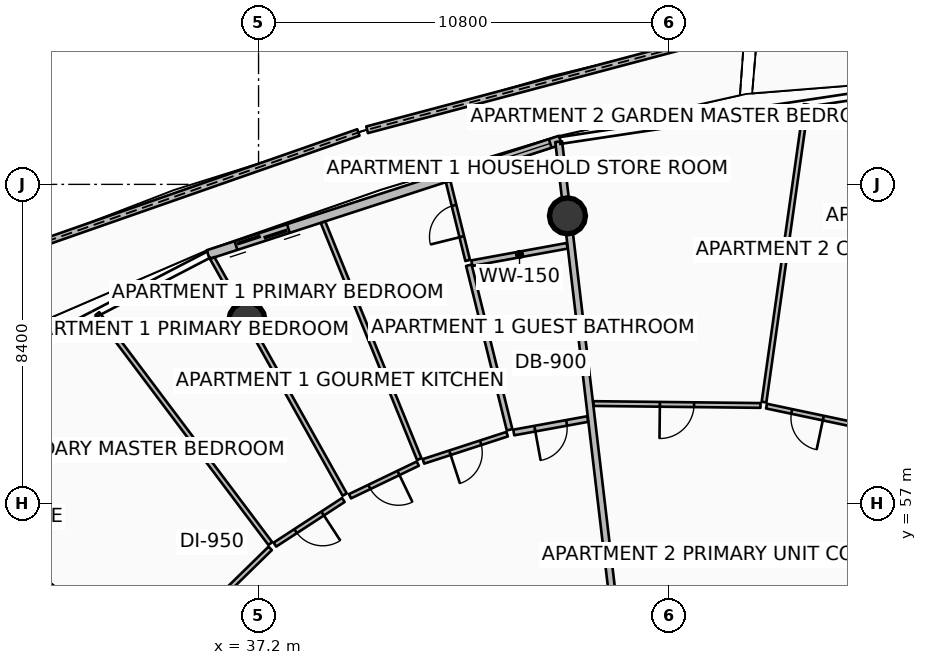
"""IFC4 building model, lengths in metres.
Left out: names, types, materials, properties, quantities, classifications, styles, units other than length and angle.
Written with IfcOpenShell. Run it as: python <this file> out.ifc"""

import sys

from ifc_helpers import new_model, si_unit, direction, frame, frame_2d, origin, origin_2d, place, context, subcontext, project, spatial, polyline, rectangle, circle, outline, extrude, element, fill, save


model = new_model("IFC4")
c1 = context("Model", 3, precision=1e-05, world=origin(), true_north=direction((0.0, 1.0)))
c2 = subcontext(c1, "Body", "Model", "MODEL_VIEW")
j1 = project(units=[si_unit("LENGTHUNIT", "METRE"), si_unit("PLANEANGLEUNIT", "RADIAN")], contexts=[c1])
p1 = place(None, origin())
s1 = spatial("IfcSite", under=j1, at=p1, CompositionType="ELEMENT")
p2 = place(p1, origin())
s2 = spatial("IfcBuilding", under=s1, at=p2, CompositionType="ELEMENT")
p3 = place(p2, frame((0.0, 0.0, 263.65)))
s3 = spatial("IfcBuildingStorey", under=s2, at=p3, CompositionType="ELEMENT", Elevation=263.65)
for number, where, z_axis, x_axis in (
    (1, (45.329, 64.571, 0.0), (0.0, 0.0, 1.0), (1.0, 0.0, 0.0)),
    (2, (36.895, 61.83, 0.0), (0.0, 0.0, 1.0), (1.0, 0.0, 0.0)),
):
    element("IfcColumn", number, at=place(p3, frame(where, z_axis=z_axis, x_axis=x_axis)), inside=s3, PredefinedType="COLUMN", context=c2, shape_type="SweptSolid", body=[
        extrude(circle(Radius=0.475, at=origin_2d()), origin(), (0.0, 0.0, 1.0), 3.59),
    ])
p4 = place(p3, frame((49.993, 69.473, 0.0), z_axis=(0.0, 0.0, 1.0), x_axis=(-0.96657188746, -0.256395761219, 0.0)))
e3 = element("IfcWall", 3, at=p4, inside=s3, PredefinedType="PARAPET", context=c2, shape_type="SweptSolid", body=[
    extrude(outline(polyline([(0.0, 0.0), (10.281, 0.0), (10.281, 1.148), (5.14, 1.127), (0.0, 1.224), (0.0, 0.0)])), frame((0.0, 0.09, 0.0), z_axis=(0.0, -1.0, 0.0), x_axis=(1.0, 0.0, 0.0)), (0.0, 0.0, 1.0), 0.18),
])
p5 = place(p3, frame((39.827, 66.766, 0.0), z_axis=(0.0, 0.0, 1.0), x_axis=(-0.944003849273, -0.329934436757, 0.0)))
e4 = element("IfcWall", 4, at=p5, inside=s3, PredefinedType="PARAPET", context=c2, shape_type="SweptSolid", body=[
    extrude(outline(polyline([(0.0, 0.0), (10.406, 0.0), (10.406, 1.483), (5.203, 1.284), (0.0, 1.148), (0.0, 0.0)])), frame((0.0, 0.09, 0.0), z_axis=(0.0, -1.0, 0.0), x_axis=(1.0, 0.0, 0.0)), (0.0, 0.0, 1.0), 0.18),
])
p6 = place(p3, frame((45.142, 66.564, 0.0), z_axis=(0.0, 0.0, 1.0), x_axis=(-0.951055974609, -0.309018661507, 0.0)))
e5 = element("IfcWall", 5, at=p6, inside=s3, PredefinedType="SOLIDWALL", context=c2, shape_type="SweptSolid", body=[
    extrude(rectangle(XDim=9.745, YDim=0.24, at=frame_2d((4.873, 0.0))), origin(), (0.0, 0.0, 1.0), 2.54),
])
p7 = place(p6, frame((7.525, 0.0, 0.0)))
e6 = element("IfcOpeningElement", 6, at=p7, cuts=e5, PredefinedType="OPENING", context=c2, shape_type="SweptSolid", body=[
    extrude(rectangle(XDim=1.45, YDim=2.15, at=frame_2d((0.725, 1.075))), frame((0.0, 0.13, 0.0), z_axis=(0.0, -1.0, 0.0), x_axis=(1.0, 0.0, 0.0)), (0.0, 0.0, 1.0), 0.26),
])
p8 = place(p6, frame((0.28, 0.0, 0.65)))
e7 = element("IfcOpeningElement", 7, at=p8, cuts=e5, PredefinedType="OPENING", context=c2, shape_type="SweptSolid", body=[
    extrude(rectangle(XDim=1.6, YDim=1.5, at=frame_2d((0.8, 0.75))), frame((0.0, 0.13, 0.0), z_axis=(0.0, -1.0, 0.0), x_axis=(1.0, 0.0, 0.0)), (0.0, 0.0, 1.0), 0.26),
])
p9 = place(p3, frame((46.75, 52.559, 0.0), z_axis=(0.0, 0.0, 1.0), x_axis=(-0.117540318076, 0.993068111273, 0.0)))
e8 = element("IfcWall", 8, at=p9, inside=s3, PredefinedType="PARTITIONING", context=c2, shape_type="SweptSolid", body=[
    extrude(rectangle(XDim=14.062, YDim=0.18, at=frame_2d((7.031, 0.0))), origin(), (0.0, 0.0, 1.0), 2.957),
])
p10 = place(p3, frame((45.861, 59.226, 0.0), z_axis=(0.0, 0.0, 1.0), x_axis=(-0.983812554945, -0.179200604723, 0.0)))
e9 = element("IfcWall", 9, at=p10, inside=s3, PredefinedType="PARTITIONING", context=c2, shape_type="SweptSolid", body=[
    extrude(rectangle(XDim=1.977, YDim=0.15, at=frame_2d((0.988, 0.0))), origin(), (0.0, 0.0, 1.0), 2.957),
])
p11 = place(p10, frame((0.563, 0.0, 0.0)))
e10 = element("IfcOpeningElement", 10, at=p11, cuts=e9, PredefinedType="OPENING", context=c2, shape_type="SweptSolid", body=[
    extrude(rectangle(XDim=0.85, YDim=2.06, at=frame_2d((0.425, 1.03))), frame((0.0, 0.085, 0.0), z_axis=(0.0, -1.0, 0.0), x_axis=(1.0, 0.0, 0.0)), (0.0, 0.0, 1.0), 0.17),
])
p12 = place(p3, frame((45.321, 63.784, 0.0), z_axis=(0.0, 0.0, 1.0), x_axis=(-0.983788616277, -0.179331978422, 0.0)))
e11 = element("IfcWall", 11, at=p12, inside=s3, PredefinedType="PARTITIONING", context=c2, shape_type="SweptSolid", body=[
    extrude(rectangle(XDim=2.55, YDim=0.15, at=frame_2d((1.275, 0.0))), origin(), (0.0, 0.0, 1.0), 2.957),
])
p13 = place(p3, frame((43.806, 58.943, 0.0), z_axis=(0.0, 0.0, 1.0), x_axis=(-0.240319531841, 0.970693835674, 0.0)))
e12 = element("IfcWall", 12, at=p13, inside=s3, PredefinedType="PARTITIONING", context=c2, shape_type="SweptSolid", body=[
    extrude(rectangle(XDim=4.46, YDim=0.15, at=frame_2d((2.23, 0.0))), origin(), (0.0, 0.0, 1.0), 3.03),
])
p14 = place(p3, frame((42.703, 63.398, 0.0), z_axis=(0.0, 0.0, 1.0), x_axis=(-0.240385432392, 0.970677517971, 0.0)))
e13 = element("IfcWall", 13, at=p14, inside=s3, PredefinedType="PARTITIONING", context=c2, shape_type="SweptSolid", body=[
    extrude(rectangle(XDim=2.138, YDim=0.125, at=frame_2d((1.069, 0.0))), origin(), (0.0, 0.0, 1.0), 3.03),
])
p15 = place(p14, frame((0.644, 0.0, 0.0)))
e14 = element("IfcOpeningElement", 14, at=p15, cuts=e13, PredefinedType="OPENING", context=c2, shape_type="SweptSolid", body=[
    extrude(rectangle(XDim=0.85, YDim=2.06, at=frame_2d((0.425, 1.03))), frame((0.0, 0.073, 0.0), z_axis=(0.0, -1.0, 0.0), x_axis=(1.0, 0.0, 0.0)), (0.0, 0.0, 1.0), 0.145),
])
p16 = place(p3, frame((41.429, 58.17, 0.0), z_axis=(0.0, 0.0, 1.0), x_axis=(-0.376458801215, 0.926433360252, 0.0)))
e15 = element("IfcWall", 15, at=p16, inside=s3, PredefinedType="PARTITIONING", context=c2, shape_type="SweptSolid", body=[
    extrude(rectangle(XDim=6.728, YDim=0.125, at=frame_2d((3.364, 0.0))), origin(), (0.0, 0.0, 1.0), 3.03),
])
p17 = place(p3, frame((43.742, 58.827, 0.0), z_axis=(0.0, 0.0, 1.0), x_axis=(-0.950997650668, -0.309198105466, 0.0)))
e16 = element("IfcWall", 16, at=p17, inside=s3, PredefinedType="PARTITIONING", context=c2, shape_type="SweptSolid", body=[
    extrude(rectangle(XDim=2.316, YDim=0.125, at=frame_2d((1.158, 0.0))), origin(), (0.0, 0.0, 1.0), 3.03),
])
p18 = place(p17, frame((0.733, 0.0, 0.0)))
e17 = element("IfcOpeningElement", 17, at=p18, cuts=e16, PredefinedType="OPENING", context=c2, shape_type="SweptSolid", body=[
    extrude(rectangle(XDim=0.85, YDim=2.06, at=frame_2d((0.425, 1.03))), frame((0.0, 0.073, 0.0), z_axis=(0.0, -1.0, 0.0), x_axis=(1.0, 0.0, 0.0)), (0.0, 0.0, 1.0), 0.145),
])
p19 = place(p3, frame((41.391, 58.052, 0.0), z_axis=(0.0, 0.0, 1.0), x_axis=(-0.901197816095, -0.433408002079, 0.0)))
e18 = element("IfcWall", 18, at=p19, inside=s3, PredefinedType="PARTITIONING", context=c2, shape_type="SweptSolid", body=[
    extrude(rectangle(XDim=1.981, YDim=0.125, at=frame_2d((0.991, 0.0))), origin(), (0.0, 0.0, 1.0), 2.957),
])
p20 = place(p19, frame((0.565, 0.0, 0.0)))
e19 = element("IfcOpeningElement", 19, at=p20, cuts=e18, PredefinedType="OPENING", context=c2, shape_type="SweptSolid", body=[
    extrude(rectangle(XDim=0.85, YDim=2.06, at=frame_2d((0.425, 1.03))), frame((0.0, 0.073, 0.0), z_axis=(0.0, -1.0, 0.0), x_axis=(1.0, 0.0, 0.0)), (0.0, 0.0, 1.0), 0.145),
])
p21 = place(p3, frame((39.467, 57.237, 0.0), z_axis=(0.0, 0.0, 1.0), x_axis=(-0.488642985948, 0.872483829239, 0.0)))
e20 = element("IfcWall", 20, at=p21, inside=s3, PredefinedType="PARTITIONING", context=c2, shape_type="SweptSolid", body=[
    extrude(rectangle(XDim=7.131, YDim=0.125, at=frame_2d((3.565, 0.0))), origin(), (0.0, 0.0, 1.0), 2.957),
])
p22 = place(p3, frame((37.509, 55.949, 0.0), z_axis=(0.0, 0.0, 1.0), x_axis=(-0.60104674722, 0.799213868534, 0.0)))
e21 = element("IfcWall", 21, at=p22, inside=s3, PredefinedType="PARTITIONING", context=c2, shape_type="SweptSolid", body=[
    extrude(rectangle(XDim=7.572, YDim=0.125, at=frame_2d((3.786, 0.0))), origin(), (0.0, 0.0, 1.0), 3.03),
])
p23 = place(p3, frame((39.432, 57.095, 0.0), z_axis=(0.0, 0.0, 1.0), x_axis=(-0.837734795217, -0.546077295703, 0.0)))
e22 = element("IfcWall", 22, at=p23, inside=s3, PredefinedType="PARTITIONING", context=c2, shape_type="SweptSolid", body=[
    extrude(rectangle(XDim=2.15, YDim=0.125, at=frame_2d((1.075, 0.0))), origin(), (0.0, 0.0, 1.0), 2.957),
])
p24 = place(p23, frame((0.65, 0.0, 0.0)))
e23 = element("IfcOpeningElement", 23, at=p24, cuts=e22, PredefinedType="OPENING", context=c2, shape_type="SweptSolid", body=[
    extrude(rectangle(XDim=0.85, YDim=2.06, at=frame_2d((0.425, 1.03))), frame((0.0, 0.073, 0.0), z_axis=(0.0, -1.0, 0.0), x_axis=(1.0, 0.0, 0.0)), (0.0, 0.0, 1.0), 0.145),
])
p25 = place(p3, frame((37.506, 55.822, 0.0), z_axis=(0.0, 0.0, 1.0), x_axis=(-0.715105814901, -0.699016218334, 0.0)))
e24 = element("IfcWall", 24, at=p25, inside=s3, PredefinedType="PARTITIONING", context=c2, shape_type="SweptSolid", body=[
    extrude(rectangle(XDim=4.294, YDim=0.125, at=frame_2d((2.147, 0.0))), origin(), (0.0, 0.0, 1.0), 2.957),
])
p26 = place(p25, frame((1.697, 0.0, 0.0)))
e25 = element("IfcOpeningElement", 25, at=p26, cuts=e24, PredefinedType="OPENING", context=c2, shape_type="SweptSolid", body=[
    extrude(rectangle(XDim=0.9, YDim=2.08, at=frame_2d((0.45, 1.04))), frame((0.0, 0.073, 0.0), z_axis=(0.0, -1.0, 0.0), x_axis=(1.0, 0.0, 0.0)), (0.0, 0.0, 1.0), 0.145),
])
p27 = place(p3, frame((34.285, 52.812, 0.0), z_axis=(0.0, 0.0, 1.0), x_axis=(-0.785324921183, 0.619083813526, 0.0)))
e26 = element("IfcWall", 26, at=p27, inside=s3, PredefinedType="PARTITIONING", context=c2, shape_type="SweptSolid", body=[
    extrude(rectangle(XDim=9.621, YDim=0.125, at=frame_2d((4.811, 0.0))), origin(), (0.0, 0.0, 1.0), 2.957),
])
p28 = place(p3, frame((50.501, 59.671, 0.0), z_axis=(0.0, 0.0, 1.0), x_axis=(0.140142335256, 0.990131367986, 0.0)))
e27 = element("IfcWall", 27, at=p28, inside=s3, PredefinedType="PARTITIONING", context=c2, shape_type="SweptSolid", body=[
    extrude(rectangle(XDim=7.911, YDim=0.125, at=frame_2d((3.956, 0.0))), origin(), (0.0, 0.0, 1.0), 3.03),
])
p29 = place(p3, frame((52.722, 59.111, 0.0), z_axis=(0.0, 0.0, 1.0), x_axis=(-0.978503905914, 0.206228286399, 0.0)))
e28 = element("IfcWall", 28, at=p29, inside=s3, PredefinedType="PARTITIONING", context=c2, shape_type="SweptSolid", body=[
    extrude(rectangle(XDim=2.203, YDim=0.125, at=frame_2d((1.102, 0.0))), origin(), (0.0, 0.0, 1.0), 2.957),
])
p30 = place(p29, frame((0.677, 0.0, 0.0)))
e29 = element("IfcOpeningElement", 29, at=p30, cuts=e28, PredefinedType="OPENING", context=c2, shape_type="SweptSolid", body=[
    extrude(rectangle(XDim=0.85, YDim=2.06, at=frame_2d((0.425, 1.03))), frame((0.0, 0.073, 0.0), z_axis=(0.0, -1.0, 0.0), x_axis=(1.0, 0.0, 0.0)), (0.0, 0.0, 1.0), 0.145),
])
p31 = place(p3, frame((50.408, 59.583, 0.0), z_axis=(0.0, 0.0, 1.0), x_axis=(-0.999935174521, 0.01138625289, 0.0)))
e30 = element("IfcWall", 30, at=p31, inside=s3, PredefinedType="PARTITIONING", context=c2, shape_type="SweptSolid", body=[
    extrude(rectangle(XDim=4.396, YDim=0.125, at=frame_2d((2.198, 0.0))), origin(), (0.0, 0.0, 1.0), 3.03),
])
p32 = place(p31, frame((1.748, 0.0, 0.0)))
e31 = element("IfcOpeningElement", 31, at=p32, cuts=e30, PredefinedType="OPENING", context=c2, shape_type="SweptSolid", body=[
    extrude(rectangle(XDim=0.9, YDim=2.08, at=frame_2d((0.45, 1.04))), frame((0.0, 0.073, 0.0), z_axis=(0.0, -1.0, 0.0), x_axis=(1.0, 0.0, 0.0)), (0.0, 0.0, 1.0), 0.145),
])
p33 = place(p7, origin())
e32 = element("IfcDoor", 32, at=p33, inside=s3, OperationType="DOUBLE_DOOR_SLIDING", PredefinedType="DOOR", context=c2, shape_type="SweptSolid", body=[
    extrude(rectangle(XDim=1.45, YDim=2.15, at=frame_2d((0.725, 1.075))), frame((0.0, 0.025, 0.0), z_axis=(0.0, -1.0, 0.0), x_axis=(1.0, 0.0, 0.0)), (0.0, 0.0, 1.0), 0.05),
])
fill(e6, e32)
p34 = place(p8, origin())
e33 = element("IfcWindow", 33, at=p34, inside=s3, PartitioningType="SINGLE_PANEL", PredefinedType="WINDOW", context=c2, shape_type="SweptSolid", body=[
    extrude(rectangle(XDim=1.6, YDim=1.5, at=frame_2d((0.8, 0.75))), frame((0.0, 0.03, 0.0), z_axis=(0.0, -1.0, 0.0), x_axis=(1.0, 0.0, 0.0)), (0.0, 0.0, 1.0), 0.06),
])
fill(e7, e33)
p35 = place(p11, origin())
e34 = element("IfcDoor", 34, at=p35, inside=s3, OperationType="SINGLE_SWING_RIGHT", PredefinedType="DOOR", context=c2, shape_type="SweptSolid", body=[
    extrude(rectangle(XDim=0.85, YDim=2.06, at=frame_2d((0.425, 1.03))), frame((0.0, 0.025, 0.0), z_axis=(0.0, -1.0, 0.0), x_axis=(1.0, 0.0, 0.0)), (0.0, 0.0, 1.0), 0.05),
])
fill(e10, e34)
p36 = place(p15, origin())
e35 = element("IfcDoor", 35, at=p36, inside=s3, OperationType="SINGLE_SWING_LEFT", PredefinedType="DOOR", context=c2, shape_type="SweptSolid", body=[
    extrude(rectangle(XDim=0.85, YDim=2.06, at=frame_2d((0.425, 1.03))), frame((0.0, 0.025, 0.0), z_axis=(0.0, -1.0, 0.0), x_axis=(1.0, 0.0, 0.0)), (0.0, 0.0, 1.0), 0.05),
])
fill(e14, e35)
p37 = place(p18, origin())
e36 = element("IfcDoor", 36, at=p37, inside=s3, OperationType="SINGLE_SWING_RIGHT", PredefinedType="DOOR", context=c2, shape_type="SweptSolid", body=[
    extrude(rectangle(XDim=0.85, YDim=2.06, at=frame_2d((0.425, 1.03))), frame((0.0, 0.025, 0.0), z_axis=(0.0, -1.0, 0.0), x_axis=(1.0, 0.0, 0.0)), (0.0, 0.0, 1.0), 0.05),
])
fill(e17, e36)
p38 = place(p20, origin())
e37 = element("IfcDoor", 37, at=p38, inside=s3, OperationType="SINGLE_SWING_LEFT", PredefinedType="DOOR", context=c2, shape_type="SweptSolid", body=[
    extrude(rectangle(XDim=0.85, YDim=2.06, at=frame_2d((0.425, 1.03))), frame((0.0, 0.025, 0.0), z_axis=(0.0, -1.0, 0.0), x_axis=(1.0, 0.0, 0.0)), (0.0, 0.0, 1.0), 0.05),
])
fill(e19, e37)
p39 = place(p24, origin())
e38 = element("IfcDoor", 38, at=p39, inside=s3, OperationType="SINGLE_SWING_LEFT", PredefinedType="DOOR", context=c2, shape_type="SweptSolid", body=[
    extrude(rectangle(XDim=0.85, YDim=2.06, at=frame_2d((0.425, 1.03))), frame((0.0, 0.025, 0.0), z_axis=(0.0, -1.0, 0.0), x_axis=(1.0, 0.0, 0.0)), (0.0, 0.0, 1.0), 0.05),
])
fill(e23, e38)
p40 = place(p30, origin())
e39 = element("IfcDoor", 39, at=p40, inside=s3, OperationType="SINGLE_SWING_LEFT", PredefinedType="DOOR", context=c2, shape_type="SweptSolid", body=[
    extrude(rectangle(XDim=0.85, YDim=2.06, at=frame_2d((0.425, 1.03))), frame((0.0, 0.025, 0.0), z_axis=(0.0, -1.0, 0.0), x_axis=(1.0, 0.0, 0.0)), (0.0, 0.0, 1.0), 0.05),
])
fill(e29, e39)
p41 = place(p32, origin())
e40 = element("IfcDoor", 40, at=p41, inside=s3, OperationType="SINGLE_SWING_RIGHT", PredefinedType="DOOR", context=c2, shape_type="SweptSolid", body=[
    extrude(rectangle(XDim=0.9, YDim=2.08, at=frame_2d((0.45, 1.04))), frame((0.0, 0.025, 0.0), z_axis=(0.0, -1.0, 0.0), x_axis=(1.0, 0.0, 0.0)), (0.0, 0.0, 1.0), 0.05),
])
fill(e31, e40)
save(model, sys.argv[1])
